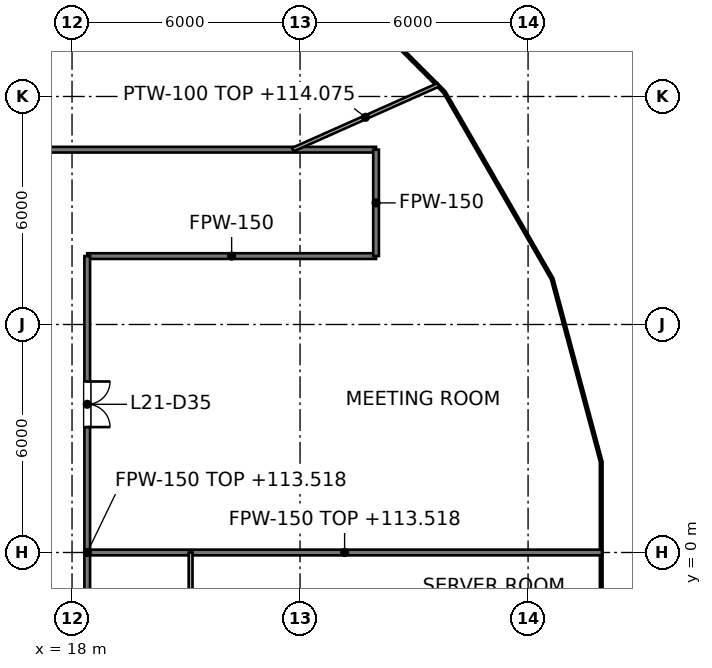
"""IFC4 building model, lengths in metres.
Left out: names, types, materials, properties, quantities, classifications, styles, units other than length and angle.
Written with IfcOpenShell. Run it as: python <this file> out.ifc"""

import sys

from ifc_helpers import new_model, si_unit, direction, frame, frame_2d, origin, place, context, subcontext, project, spatial, rectangle, extrude, element, fill, save


model = new_model("IFC4")
c1 = context("Model", 3, precision=1e-05, world=origin(), true_north=direction((0.0, 1.0)))
c2 = subcontext(c1, "Body", "Model", "MODEL_VIEW")
j1 = project(units=[si_unit("LENGTHUNIT", "METRE"), si_unit("PLANEANGLEUNIT", "RADIAN")], contexts=[c1])
p1 = place(None, origin())
s1 = spatial("IfcSite", under=j1, at=p1, CompositionType="ELEMENT")
p2 = place(p1, origin())
s2 = spatial("IfcBuilding", under=s1, at=p2, CompositionType="ELEMENT")
p3 = place(p2, frame((0.0, 0.0, 110.4)))
s3 = spatial("IfcBuildingStorey", under=s2, at=p3, CompositionType="ELEMENT", Elevation=110.4)
p4 = place(p3, frame((18.4, 0.0, 0.0), z_axis=(0.0, 0.0, 1.0), x_axis=(1.0, 0.0, 0.0)))
e1 = element("IfcWall", 1, at=p4, inside=s3, PredefinedType="PARTITIONING", context=c2, shape_type="SweptSolid", body=[
    extrude(rectangle(XDim=13.544, YDim=0.15, at=frame_2d((6.772, 0.0))), origin(), (0.0, 0.0, 1.0), 3.118),
])
p5 = place(p3, frame((18.4, 7.8, 0.0), z_axis=(0.0, 0.0, 1.0), x_axis=(1.0, 0.0, 0.0)))
e2 = element("IfcWall", 2, at=p5, inside=s3, PredefinedType="PARTITIONING", context=c2, shape_type="SweptSolid", body=[
    extrude(rectangle(XDim=7.6, YDim=0.15, at=frame_2d((3.8, 0.0))), origin(), (0.0, 0.0, 1.0), 3.195),
])
p6 = place(p3, frame((-26.0, 10.6, 0.0), z_axis=(0.0, 0.0, 1.0), x_axis=(1.0, 0.0, 0.0)))
e3 = element("IfcWall", 3, at=p6, inside=s3, PredefinedType="PARTITIONING", context=c2, shape_type="SweptSolid", body=[
    extrude(rectangle(XDim=52.0, YDim=0.15, at=frame_2d((26.0, 0.0))), origin(), (0.0, 0.0, 1.0), 3.127),
])
p7 = place(p6, frame((18.729, 0.0, 0.0)))
e4 = element("IfcOpeningElement", 4, at=p7, cuts=e3, PredefinedType="OPENING", context=c2, shape_type="SweptSolid", body=[
    extrude(rectangle(XDim=1.0, YDim=2.1, at=frame_2d((0.5, 1.05))), frame((0.0, 0.075, 0.0), z_axis=(0.0, -1.0, 0.0), x_axis=(1.0, 0.0, 0.0)), (0.0, 0.0, 1.0), 0.15),
])
p8 = place(p6, frame((7.05, 0.0, 0.0)))
e5 = element("IfcOpeningElement", 5, at=p8, cuts=e3, PredefinedType="OPENING", context=c2, shape_type="SweptSolid", body=[
    extrude(rectangle(XDim=1.2, YDim=2.1, at=frame_2d((0.6, 1.05))), frame((0.0, 0.075, 0.0), z_axis=(0.0, -1.0, 0.0), x_axis=(1.0, 0.0, 0.0)), (0.0, 0.0, 1.0), 0.15),
])
p9 = place(p6, frame((40.464, 0.0, 0.0)))
e6 = element("IfcOpeningElement", 6, at=p9, cuts=e3, PredefinedType="OPENING", context=c2, shape_type="SweptSolid", body=[
    extrude(rectangle(XDim=1.0, YDim=2.1, at=frame_2d((0.5, 1.05))), frame((0.0, 0.075, 0.0), z_axis=(0.0, -1.0, 0.0), x_axis=(1.0, 0.0, 0.0)), (0.0, 0.0, 1.0), 0.15),
])
p10 = place(p6, frame((27.09, 0.0, 0.0)))
e7 = element("IfcOpeningElement", 7, at=p10, cuts=e3, PredefinedType="OPENING", context=c2, shape_type="SweptSolid", body=[
    extrude(rectangle(XDim=1.0, YDim=2.1, at=frame_2d((0.5, 1.05))), frame((0.0, 0.075, 0.0), z_axis=(0.0, -1.0, 0.0), x_axis=(1.0, 0.0, 0.0)), (0.0, 0.0, 1.0), 0.15),
])
p11 = place(p3, frame((26.0, 7.8, 0.0), z_axis=(0.0, 0.0, 1.0), x_axis=(0.0, 1.0, 0.0)))
e8 = element("IfcWall", 8, at=p11, inside=s3, PredefinedType="PARTITIONING", context=c2, shape_type="SweptSolid", body=[
    extrude(rectangle(XDim=2.8, YDim=0.15, at=frame_2d((1.4, 0.0))), origin(), (0.0, 0.0, 1.0), 3.195),
])
p12 = place(p3, frame((18.4, -7.8, 0.0), z_axis=(0.0, 0.0, 1.0), x_axis=(0.0, 1.0, 0.0)))
e9 = element("IfcWall", 9, at=p12, inside=s3, PredefinedType="PARTITIONING", context=c2, shape_type="SweptSolid", body=[
    extrude(rectangle(XDim=15.6, YDim=0.15, at=frame_2d((7.8, 0.0))), origin(), (0.0, 0.0, 1.0), 3.118),
])
p13 = place(p12, frame((3.4, 0.0, 0.0)))
e10 = element("IfcOpeningElement", 10, at=p13, cuts=e9, PredefinedType="OPENING", context=c2, shape_type="SweptSolid", body=[
    extrude(rectangle(XDim=1.0, YDim=2.1, at=frame_2d((0.5, 1.05))), frame((0.0, 0.075, 0.0), z_axis=(0.0, -1.0, 0.0), x_axis=(1.0, 0.0, 0.0)), (0.0, 0.0, 1.0), 0.15),
])
p14 = place(p12, frame((11.1, 0.0, 0.0)))
e11 = element("IfcOpeningElement", 11, at=p14, cuts=e9, PredefinedType="OPENING", context=c2, shape_type="SweptSolid", body=[
    extrude(rectangle(XDim=1.2, YDim=2.1, at=frame_2d((0.6, 1.05))), frame((0.0, 0.075, 0.0), z_axis=(0.0, -1.0, 0.0), x_axis=(1.0, 0.0, 0.0)), (0.0, 0.0, 1.0), 0.15),
])
p15 = place(p3, frame((23.808, 10.6, 0.0), z_axis=(0.0, 0.0, 1.0), x_axis=(0.913496537011, 0.406846502835, 0.0)))
e12 = element("IfcWall", 12, at=p15, inside=s3, PredefinedType="PARTITIONING", context=c2, shape_type="SweptSolid", body=[
    extrude(rectangle(XDim=4.19, YDim=0.1, at=frame_2d((2.095, 0.0))), origin(), (0.0, 0.0, 1.0), 3.675),
])
p16 = place(p3, frame((21.12, -5.08, 0.0), z_axis=(0.0, 0.0, 1.0), x_axis=(0.0, 1.0, 0.0)))
e13 = element("IfcWall", 13, at=p16, inside=s3, PredefinedType="PARTITIONING", context=c2, shape_type="SweptSolid", body=[
    extrude(rectangle(XDim=5.08, YDim=0.1, at=frame_2d((2.54, 0.0))), origin(), (0.0, 0.0, 1.0), 3.118),
])
p17 = place(p14, origin())
e14 = element("IfcDoor", 14, at=p17, inside=s3, OperationType="DOUBLE_DOOR_SINGLE_SWING", PredefinedType="DOOR", context=c2, shape_type="SweptSolid", body=[
    extrude(rectangle(XDim=1.2, YDim=2.1, at=frame_2d((0.6, 1.05))), frame((0.0, 0.025, 0.0), z_axis=(0.0, -1.0, 0.0), x_axis=(1.0, 0.0, 0.0)), (0.0, 0.0, 1.0), 0.05),
])
fill(e11, e14)
save(model, sys.argv[1])
